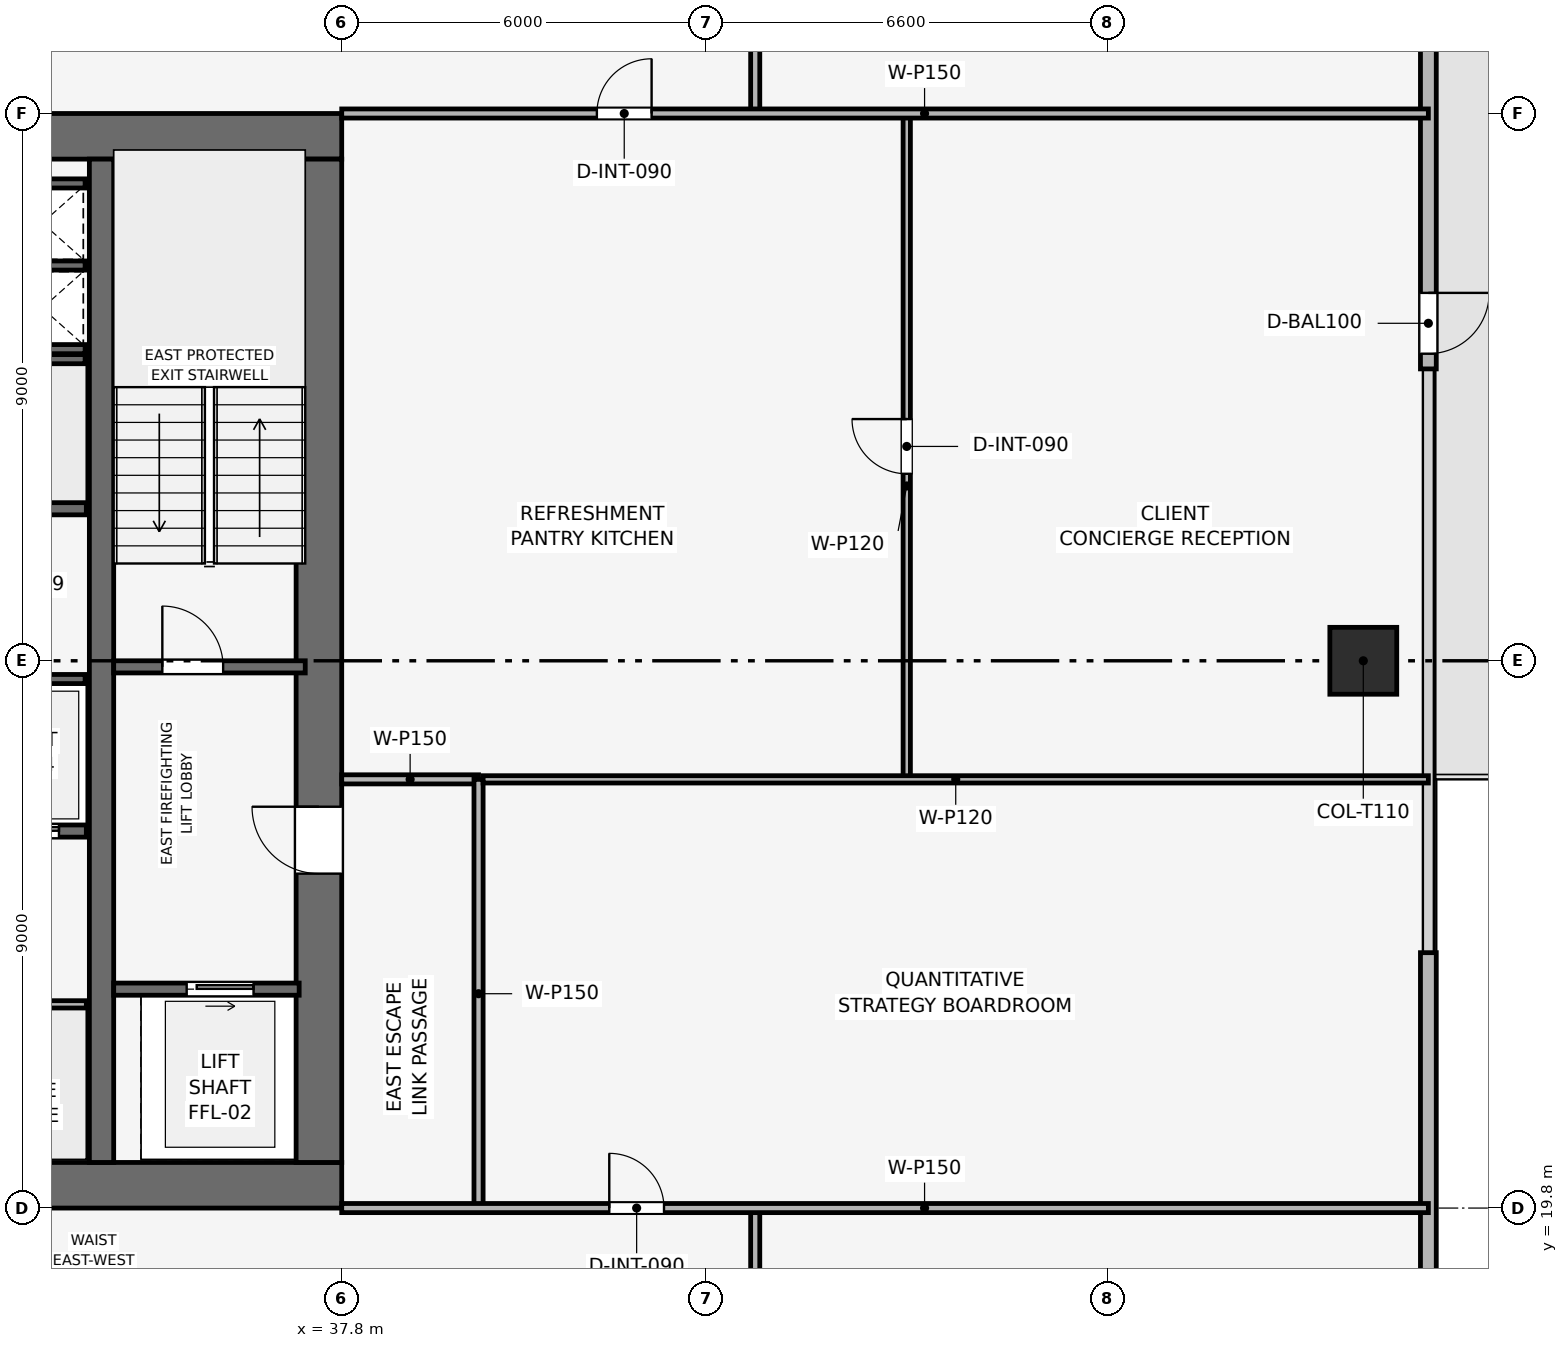
"""IFC4 building model, lengths in metres.
Left out: names, types, materials, properties, quantities, classifications, styles, units other than length and angle.
Written with IfcOpenShell. Run it as: python <this file> out.ifc"""

import sys

from ifc_helpers import new_model, si_unit, direction, frame, frame_2d, origin, origin_2d, place, context, subcontext, project, spatial, rectangle, extrude, element, fill, save


model = new_model("IFC4")
c1 = context("Model", 3, precision=1e-05, world=origin(), true_north=direction((0.0, 1.0)))
c2 = subcontext(c1, "Body", "Model", "MODEL_VIEW")
j1 = project(units=[si_unit("LENGTHUNIT", "METRE"), si_unit("PLANEANGLEUNIT", "RADIAN")], contexts=[c1])
p1 = place(None, origin())
s1 = spatial("IfcSite", under=j1, at=p1, CompositionType="ELEMENT")
p2 = place(p1, origin())
s2 = spatial("IfcBuilding", under=s1, at=p2, CompositionType="ELEMENT")
p3 = place(p2, frame((0.0, 0.0, 233.7)))
s3 = spatial("IfcBuildingStorey", under=s2, at=p3, CompositionType="ELEMENT", Elevation=233.7)
p4 = place(p3, frame((19.8, 20.175, 0.0), z_axis=(0.0, 0.0, 1.0), x_axis=(1.0, 0.0, 0.0)))
e1 = element("IfcWall", 1, at=p4, inside=s3, PredefinedType="SHEAR", context=c2, shape_type="SweptSolid", body=[
    extrude(rectangle(XDim=18.0, YDim=0.75, at=frame_2d((9.0, 0.0))), origin(), (0.0, 0.0, 1.0), 3.75),
])
p5 = place(p4, frame((8.4, 0.0, 0.0)))
e2 = element("IfcOpeningElement", 2, at=p5, cuts=e1, PredefinedType="OPENING", context=c2, shape_type="SweptSolid", body=[
    extrude(rectangle(XDim=1.2, YDim=2.2, at=frame_2d((0.6, 1.1))), frame((0.0, 0.385, 0.0), z_axis=(0.0, -1.0, 0.0), x_axis=(1.0, 0.0, 0.0)), (0.0, 0.0, 1.0), 0.77),
])
p6 = place(p3, frame((19.8, 37.425, 0.0), z_axis=(0.0, 0.0, 1.0), x_axis=(1.0, 0.0, 0.0)))
e3 = element("IfcWall", 3, at=p6, inside=s3, PredefinedType="SHEAR", context=c2, shape_type="SweptSolid", body=[
    extrude(rectangle(XDim=18.0, YDim=0.75, at=frame_2d((9.0, 0.0))), origin(), (0.0, 0.0, 1.0), 3.75),
])
p7 = place(p6, frame((7.05, 0.0, 0.0)))
e4 = element("IfcOpeningElement", 4, at=p7, cuts=e3, PredefinedType="OPENING", context=c2, shape_type="SweptSolid", body=[
    extrude(rectangle(XDim=1.1, YDim=2.15, at=frame_2d((0.55, 1.075))), frame((0.0, 0.385, 0.0), z_axis=(0.0, -1.0, 0.0), x_axis=(1.0, 0.0, 0.0)), (0.0, 0.0, 1.0), 0.77),
])
p8 = place(p3, frame((37.425, 20.55, 0.0), z_axis=(0.0, 0.0, 1.0), x_axis=(0.0, 1.0, 0.0)))
e5 = element("IfcWall", 5, at=p8, inside=s3, PredefinedType="SHEAR", context=c2, shape_type="SweptSolid", body=[
    extrude(rectangle(XDim=16.5, YDim=0.75, at=frame_2d((8.25, 0.0))), origin(), (0.0, 0.0, 1.0), 3.75),
])
p9 = place(p8, frame((4.75, 0.0, 0.0)))
e6 = element("IfcOpeningElement", 6, at=p9, cuts=e5, PredefinedType="OPENING", context=c2, shape_type="SweptSolid", body=[
    extrude(rectangle(XDim=1.1, YDim=2.15, at=frame_2d((0.55, 1.075))), frame((0.0, 0.385, 0.0), z_axis=(0.0, -1.0, 0.0), x_axis=(1.0, 0.0, 0.0)), (0.0, 0.0, 1.0), 0.77),
])
p10 = place(p3, frame((33.85, 20.55, 0.0), z_axis=(0.0, 0.0, 1.0), x_axis=(0.0, 1.0, 0.0)))
e7 = element("IfcWall", 7, at=p10, inside=s3, PredefinedType="SHEAR", context=c2, shape_type="SweptSolid", body=[
    extrude(rectangle(XDim=16.5, YDim=0.4, at=frame_2d((8.25, 0.0))), origin(), (0.0, 0.0, 1.0), 3.75),
])
p11 = place(p3, frame((54.6, 28.8, 0.003), z_axis=(0.0, 0.0, 1.0), x_axis=(1.0, 0.0, 0.0)))
e8 = element("IfcColumn", 8, at=p11, inside=s3, PredefinedType="COLUMN", context=c2, shape_type="SweptSolid", body=[
    extrude(rectangle(XDim=1.1, YDim=1.1, at=origin_2d()), origin(), (0.0, 0.0, 1.0), 3.494),
])
p12 = place(p3, frame((55.67, 48.3, 0.0), z_axis=(0.0, 0.0, 1.0), x_axis=(0.0, -1.0, 0.0)))
e9 = element("IfcWall", 9, at=p12, inside=s3, PredefinedType="SOLIDWALL", context=c2, shape_type="SweptSolid", body=[
    extrude(rectangle(XDim=14.7, YDim=0.26, at=frame_2d((7.35, 0.0))), origin(), (0.0, 0.0, 1.0), 3.5),
])
p13 = place(p12, frame((13.45, 0.0, 0.0)))
e10 = element("IfcOpeningElement", 10, at=p13, cuts=e9, PredefinedType="OPENING", context=c2, shape_type="SweptSolid", body=[
    extrude(rectangle(XDim=1.0, YDim=2.2, at=frame_2d((0.5, 1.1))), frame((0.0, 0.14, 0.0), z_axis=(0.0, -1.0, 0.0), x_axis=(1.0, 0.0, 0.0)), (0.0, 0.0, 1.0), 0.28),
])
p14 = place(p3, frame((55.67, 24.0, 0.0), z_axis=(0.0, 0.0, 1.0), x_axis=(0.0, -1.0, 0.0)))
e11 = element("IfcWall", 11, at=p14, inside=s3, PredefinedType="SOLIDWALL", context=c2, shape_type="SweptSolid", body=[
    extrude(rectangle(XDim=14.7, YDim=0.26, at=frame_2d((7.35, 0.0))), origin(), (0.0, 0.0, 1.0), 3.5),
])
p15 = place(p14, frame((10.65, 0.0, 0.9)))
e12 = element("IfcOpeningElement", 12, at=p15, cuts=e11, PredefinedType="OPENING", context=c2, shape_type="SweptSolid", body=[
    extrude(rectangle(XDim=3.8, YDim=1.9, at=frame_2d((1.9, 0.95))), frame((0.0, 0.14, 0.0), z_axis=(0.0, -1.0, 0.0), x_axis=(1.0, 0.0, 0.0)), (0.0, 0.0, 1.0), 0.28),
])
p16 = place(p3, frame((34.05, 28.7, 0.0), z_axis=(0.0, 0.0, 1.0), x_axis=(1.0, 0.0, 0.0)))
e13 = element("IfcWall", 13, at=p16, inside=s3, PredefinedType="SHEAR", context=c2, shape_type="SweptSolid", body=[
    extrude(rectangle(XDim=3.15, YDim=0.2, at=frame_2d((1.575, 0.0))), origin(), (0.0, 0.0, 1.0), 3.5),
])
p17 = place(p16, frame((0.8, 0.0, 0.0)))
e14 = element("IfcOpeningElement", 14, at=p17, cuts=e13, PredefinedType="OPENING", context=c2, shape_type="SweptSolid", body=[
    extrude(rectangle(XDim=1.0, YDim=2.1, at=frame_2d((0.5, 1.05))), frame((0.0, 0.11, 0.0), z_axis=(0.0, -1.0, 0.0), x_axis=(1.0, 0.0, 0.0)), (0.0, 0.0, 1.0), 0.22),
])
for number, where, z_axis, x_axis in (
    (15, (32.25, 33.925, 0.0), (0.0, 0.0, 1.0), (1.0, 0.0, 0.0)),
    (16, (32.25, 35.3, 0.0), (0.0, 0.0, 1.0), (1.0, 0.0, 0.0)),
):
    element("IfcWall", number, at=place(p3, frame(where, z_axis=z_axis, x_axis=x_axis)), inside=s3, PredefinedType="SHEAR", context=c2, shape_type="SweptSolid", body=[
        extrude(rectangle(XDim=1.33, YDim=0.15, at=frame_2d((0.665, 0.0))), origin(), (0.0, 0.0, 1.0), 3.5),
    ])
p18 = place(p3, frame((34.05, 23.4, 0.0), z_axis=(0.0, 0.0, 1.0), x_axis=(1.0, 0.0, 0.0)))
e17 = element("IfcWall", 17, at=p18, inside=s3, PredefinedType="SHEAR", context=c2, shape_type="SweptSolid", body=[
    extrude(rectangle(XDim=3.05, YDim=0.2, at=frame_2d((1.525, 0.0))), origin(), (0.0, 0.0, 1.0), 3.5),
])
p19 = place(p18, frame((1.2, 0.0, 0.0)))
e18 = element("IfcOpeningElement", 18, at=p19, cuts=e17, PredefinedType="OPENING", context=c2, shape_type="SweptSolid", body=[
    extrude(rectangle(XDim=1.1, YDim=2.15, at=frame_2d((0.55, 1.075))), frame((0.0, 0.11, 0.0), z_axis=(0.0, -1.0, 0.0), x_axis=(1.0, 0.0, 0.0)), (0.0, 0.0, 1.0), 0.22),
])
p20 = place(p3, frame((31.6, 26.0, 0.0), z_axis=(0.0, 0.0, 1.0), x_axis=(1.0, 0.0, 0.0)))
e19 = element("IfcWall", 19, at=p20, inside=s3, PredefinedType="SHEAR", context=c2, shape_type="SweptSolid", body=[
    extrude(rectangle(XDim=2.0, YDim=0.2, at=frame_2d((1.0, 0.0))), origin(), (0.0, 0.0, 1.0), 3.5),
])
p21 = place(p20, frame((0.45, 0.0, 0.0)))
e20 = element("IfcOpeningElement", 20, at=p21, cuts=e19, PredefinedType="OPENING", context=c2, shape_type="SweptSolid", body=[
    extrude(rectangle(XDim=1.1, YDim=2.15, at=frame_2d((0.55, 1.075))), frame((0.0, 0.11, 0.0), z_axis=(0.0, -1.0, 0.0), x_axis=(1.0, 0.0, 0.0)), (0.0, 0.0, 1.0), 0.22),
])
p22 = place(p3, frame((31.6, 31.3, 0.0), z_axis=(0.0, 0.0, 1.0), x_axis=(1.0, 0.0, 0.0)))
e21 = element("IfcWall", 21, at=p22, inside=s3, PredefinedType="SHEAR", context=c2, shape_type="SweptSolid", body=[
    extrude(rectangle(XDim=2.0, YDim=0.2, at=frame_2d((1.0, 0.0))), origin(), (0.0, 0.0, 1.0), 3.5),
])
p23 = place(p3, frame((32.25, 36.65, 0.0), z_axis=(0.0, 0.0, 1.0), x_axis=(1.0, 0.0, 0.0)))
e22 = element("IfcWall", 22, at=p23, inside=s3, PredefinedType="SHEAR", context=c2, shape_type="SweptSolid", body=[
    extrude(rectangle(XDim=1.33, YDim=0.15, at=frame_2d((0.665, 0.0))), origin(), (0.0, 0.0, 1.0), 3.5),
])
for number, where, z_axis, x_axis in (
    (23, (29.5, 28.5, 0.0), (0.0, 0.0, 1.0), (1.0, 0.0, 0.0)),
    (24, (29.5, 33.76, 0.0), (0.0, 0.0, 1.0), (1.0, 0.0, 0.0)),
):
    element("IfcWall", number, at=place(p3, frame(where, z_axis=z_axis, x_axis=x_axis)), inside=s3, PredefinedType="SHEAR", context=c2, shape_type="SweptSolid", body=[
        extrude(rectangle(XDim=4.08, YDim=0.15, at=frame_2d((2.04, 0.0))), origin(), (0.0, 0.0, 1.0), 3.5),
    ])
p24 = place(p3, frame((29.55, 23.15, 0.0), z_axis=(0.0, 0.0, 1.0), x_axis=(1.0, 0.0, 0.0)))
e25 = element("IfcWall", 25, at=p24, inside=s3, PredefinedType="PARTITIONING", context=c2, shape_type="SweptSolid", body=[
    extrude(rectangle(XDim=4.05, YDim=0.12, at=frame_2d((2.025, 0.0))), origin(), (0.0, 0.0, 1.0), 3.5),
])
p25 = place(p24, frame((1.575, 0.0, 0.0)))
e26 = element("IfcOpeningElement", 26, at=p25, cuts=e25, PredefinedType="OPENING", context=c2, shape_type="SweptSolid", body=[
    extrude(rectangle(XDim=0.9, YDim=2.1, at=frame_2d((0.45, 1.05))), frame((0.0, 0.07, 0.0), z_axis=(0.0, -1.0, 0.0), x_axis=(1.0, 0.0, 0.0)), (0.0, 0.0, 1.0), 0.14),
])
p26 = place(p3, frame((37.8, 26.85, 0.0), z_axis=(0.0, 0.0, 1.0), x_axis=(1.0, 0.0, 0.0)))
e27 = element("IfcWall", 27, at=p26, inside=s3, PredefinedType="PARTITIONING", context=c2, shape_type="SweptSolid", body=[
    extrude(rectangle(XDim=2.25, YDim=0.15, at=frame_2d((1.125, 0.0))), origin(), (0.0, 0.0, 1.0), 3.5),
])
p27 = place(p3, frame((40.05, 19.8, 0.0), z_axis=(0.0, 0.0, 1.0), x_axis=(0.0, 1.0, 0.0)))
e28 = element("IfcWall", 28, at=p27, inside=s3, PredefinedType="PARTITIONING", context=c2, shape_type="SweptSolid", body=[
    extrude(rectangle(XDim=7.05, YDim=0.15, at=frame_2d((3.525, 0.0))), origin(), (0.0, 0.0, 1.0), 3.035),
])
p28 = place(p3, frame((47.092, 26.85, 0.0), z_axis=(0.0, 0.0, 1.0), x_axis=(0.0, 1.0, 0.0)))
e29 = element("IfcWall", 29, at=p28, inside=s3, PredefinedType="PARTITIONING", context=c2, shape_type="SweptSolid", body=[
    extrude(rectangle(XDim=10.95, YDim=0.12, at=frame_2d((5.475, 0.0))), origin(), (0.0, 0.0, 1.0), 3.035),
])
p29 = place(p28, frame((5.025, 0.0, 0.0)))
e30 = element("IfcOpeningElement", 30, at=p29, cuts=e29, PredefinedType="OPENING", context=c2, shape_type="SweptSolid", body=[
    extrude(rectangle(XDim=0.9, YDim=2.1, at=frame_2d((0.45, 1.05))), frame((0.0, 0.07, 0.0), z_axis=(0.0, -1.0, 0.0), x_axis=(1.0, 0.0, 0.0)), (0.0, 0.0, 1.0), 0.14),
])
p30 = place(p3, frame((40.125, 26.85, 0.0), z_axis=(0.0, 0.0, 1.0), x_axis=(1.0, 0.0, 0.0)))
e31 = element("IfcWall", 31, at=p30, inside=s3, PredefinedType="PARTITIONING", context=c2, shape_type="SweptSolid", body=[
    extrude(rectangle(XDim=15.545, YDim=0.12, at=frame_2d((7.772, 0.0))), origin(), (0.0, 0.0, 1.0), 2.885),
])
p31 = place(p3, frame((44.6, 17.4, 0.0), z_axis=(0.0, 0.0, 1.0), x_axis=(0.0, 1.0, 0.0)))
e32 = element("IfcWall", 32, at=p31, inside=s3, PredefinedType="PARTITIONING", context=c2, shape_type="SweptSolid", body=[
    extrude(rectangle(XDim=2.4, YDim=0.15, at=frame_2d((1.2, 0.0))), origin(), (0.0, 0.0, 1.0), 3.5),
])
p32 = place(p3, frame((44.6, 37.8, 0.0), z_axis=(0.0, 0.0, 1.0), x_axis=(0.0, 1.0, 0.0)))
e33 = element("IfcWall", 33, at=p32, inside=s3, PredefinedType="PARTITIONING", context=c2, shape_type="SweptSolid", body=[
    extrude(rectangle(XDim=2.4, YDim=0.15, at=frame_2d((1.2, 0.0))), origin(), (0.0, 0.0, 1.0), 3.5),
])
p33 = place(p3, frame((37.8, 19.8, 0.0), z_axis=(0.0, 0.0, 1.0), x_axis=(1.0, 0.0, 0.0)))
e34 = element("IfcWall", 34, at=p33, inside=s3, PredefinedType="PARTITIONING", context=c2, shape_type="SweptSolid", body=[
    extrude(rectangle(XDim=17.87, YDim=0.15, at=frame_2d((8.935, 0.0))), origin(), (0.0, 0.0, 1.0), 2.885),
])
p34 = place(p33, frame((4.4, 0.0, 0.0)))
e35 = element("IfcOpeningElement", 35, at=p34, cuts=e34, PredefinedType="OPENING", context=c2, shape_type="SweptSolid", body=[
    extrude(rectangle(XDim=0.9, YDim=2.1, at=frame_2d((0.45, 1.05))), frame((0.0, 0.085, 0.0), z_axis=(0.0, -1.0, 0.0), x_axis=(1.0, 0.0, 0.0)), (0.0, 0.0, 1.0), 0.17),
])
p35 = place(p3, frame((37.8, 37.8, 0.0), z_axis=(0.0, 0.0, 1.0), x_axis=(1.0, 0.0, 0.0)))
e36 = element("IfcWall", 36, at=p35, inside=s3, PredefinedType="PARTITIONING", context=c2, shape_type="SweptSolid", body=[
    extrude(rectangle(XDim=17.87, YDim=0.15, at=frame_2d((8.935, 0.0))), origin(), (0.0, 0.0, 1.0), 2.885),
])
p36 = place(p35, frame((4.196, 0.0, 0.0)))
e37 = element("IfcOpeningElement", 37, at=p36, cuts=e36, PredefinedType="OPENING", context=c2, shape_type="SweptSolid", body=[
    extrude(rectangle(XDim=0.9, YDim=2.1, at=frame_2d((0.45, 1.05))), frame((0.0, 0.085, 0.0), z_axis=(0.0, -1.0, 0.0), x_axis=(1.0, 0.0, 0.0)), (0.0, 0.0, 1.0), 0.17),
])
p37 = place(p13, origin())
e38 = element("IfcDoor", 38, at=p37, inside=s3, OperationType="SINGLE_SWING_LEFT", PredefinedType="DOOR", context=c2, shape_type="SweptSolid", body=[
    extrude(rectangle(XDim=1.0, YDim=2.2, at=frame_2d((0.5, 1.1))), frame((0.0, 0.025, 0.0), z_axis=(0.0, -1.0, 0.0), x_axis=(1.0, 0.0, 0.0)), (0.0, 0.0, 1.0), 0.05),
])
fill(e10, e38)
p38 = place(p17, origin())
e39 = element("IfcDoor", 39, at=p38, inside=s3, OperationType="SINGLE_SWING_LEFT", PredefinedType="DOOR", context=c2, shape_type="SweptSolid", body=[
    extrude(rectangle(XDim=1.0, YDim=2.1, at=frame_2d((0.5, 1.05))), frame((0.0, 0.025, 0.0), z_axis=(0.0, -1.0, 0.0), x_axis=(1.0, 0.0, 0.0)), (0.0, 0.0, 1.0), 0.05),
])
fill(e14, e39)
p39 = place(p19, origin())
e40 = element("IfcDoor", 40, at=p39, inside=s3, OperationType="SLIDING_TO_RIGHT", PredefinedType="DOOR", context=c2, shape_type="SweptSolid", body=[
    extrude(rectangle(XDim=1.1, YDim=2.15, at=frame_2d((0.55, 1.075))), frame((0.0, 0.025, 0.0), z_axis=(0.0, -1.0, 0.0), x_axis=(1.0, 0.0, 0.0)), (0.0, 0.0, 1.0), 0.05),
])
fill(e18, e40)
p40 = place(p21, origin())
e41 = element("IfcDoor", 41, at=p40, inside=s3, OperationType="SLIDING_TO_RIGHT", PredefinedType="DOOR", context=c2, shape_type="SweptSolid", body=[
    extrude(rectangle(XDim=1.1, YDim=2.15, at=frame_2d((0.55, 1.075))), frame((0.0, 0.025, 0.0), z_axis=(0.0, -1.0, 0.0), x_axis=(1.0, 0.0, 0.0)), (0.0, 0.0, 1.0), 0.05),
])
fill(e20, e41)
p41 = place(p29, origin())
e42 = element("IfcDoor", 42, at=p41, inside=s3, OperationType="SINGLE_SWING_RIGHT", PredefinedType="DOOR", context=c2, shape_type="SweptSolid", body=[
    extrude(rectangle(XDim=0.9, YDim=2.1, at=frame_2d((0.45, 1.05))), frame((0.0, 0.025, 0.0), z_axis=(0.0, -1.0, 0.0), x_axis=(1.0, 0.0, 0.0)), (0.0, 0.0, 1.0), 0.05),
])
fill(e30, e42)
p42 = place(p34, origin())
e43 = element("IfcDoor", 43, at=p42, inside=s3, OperationType="SINGLE_SWING_LEFT", PredefinedType="DOOR", context=c2, shape_type="SweptSolid", body=[
    extrude(rectangle(XDim=0.9, YDim=2.1, at=frame_2d((0.45, 1.05))), frame((0.0, 0.025, 0.0), z_axis=(0.0, -1.0, 0.0), x_axis=(1.0, 0.0, 0.0)), (0.0, 0.0, 1.0), 0.05),
])
fill(e35, e43)
p43 = place(p36, origin())
e44 = element("IfcDoor", 44, at=p43, inside=s3, OperationType="SINGLE_SWING_RIGHT", PredefinedType="DOOR", context=c2, shape_type="SweptSolid", body=[
    extrude(rectangle(XDim=0.9, YDim=2.1, at=frame_2d((0.45, 1.05))), frame((0.0, 0.025, 0.0), z_axis=(0.0, -1.0, 0.0), x_axis=(1.0, 0.0, 0.0)), (0.0, 0.0, 1.0), 0.05),
])
fill(e37, e44)
p44 = place(p9, origin())
e45 = element("IfcDoor", 45, at=p44, inside=s3, OperationType="SINGLE_SWING_RIGHT", PredefinedType="DOOR", context=c2, shape_type="SweptSolid", body=[
    extrude(rectangle(XDim=1.1, YDim=2.15, at=frame_2d((0.55, 1.075))), frame((0.0, 0.025, 0.0), z_axis=(0.0, -1.0, 0.0), x_axis=(1.0, 0.0, 0.0)), (0.0, 0.0, 1.0), 0.05),
])
fill(e6, e45)
save(model, sys.argv[1])
